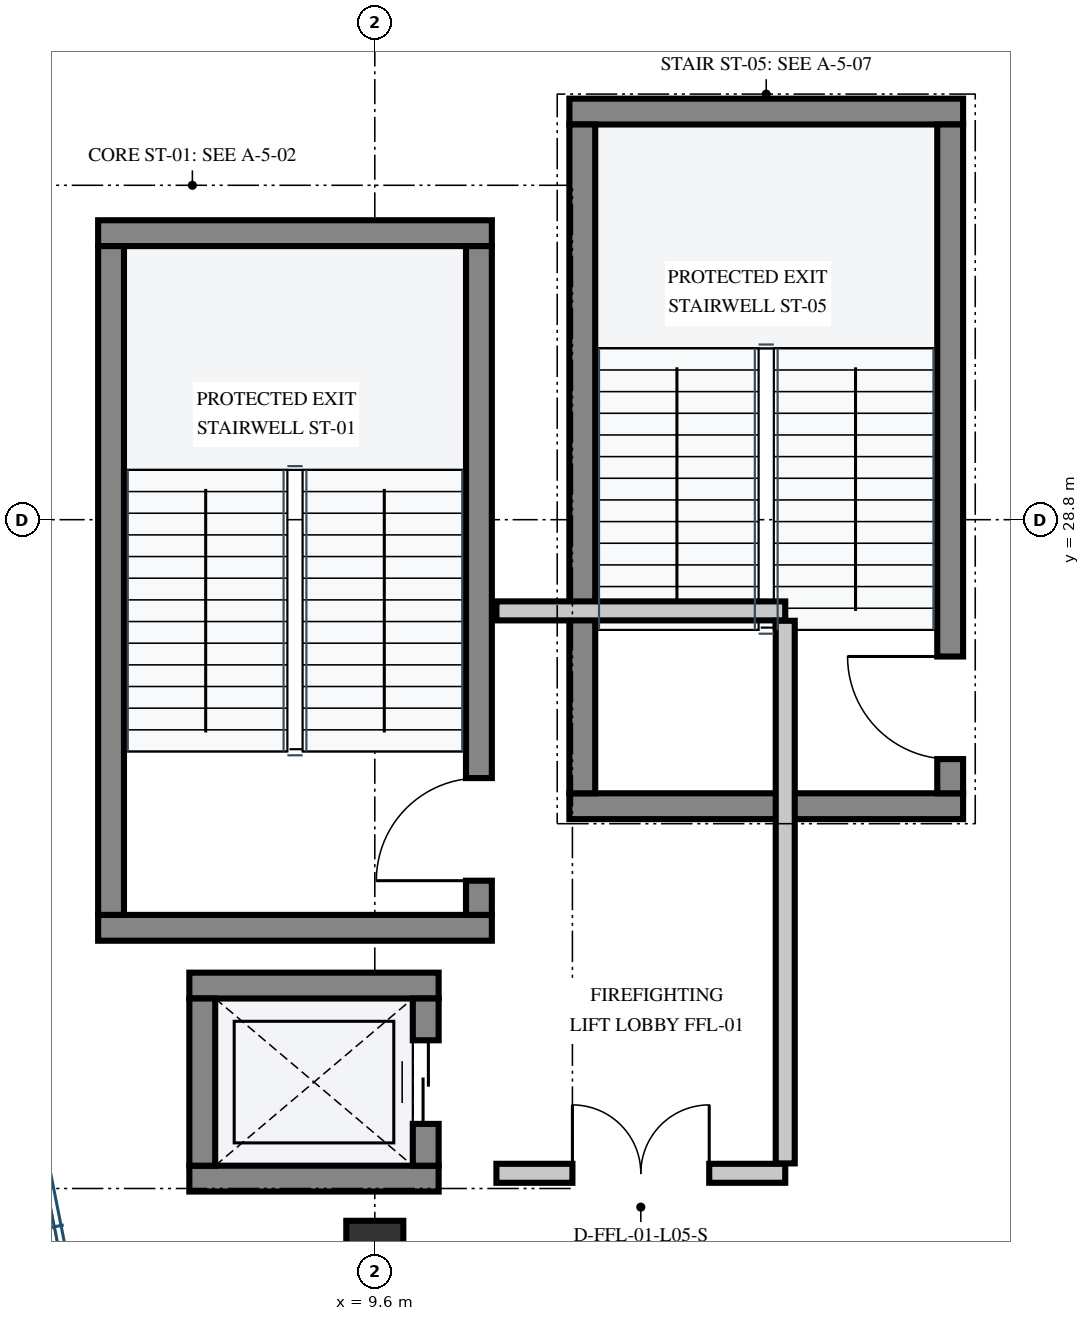
"""IFC4 building model, lengths in metres.
Left out: names, types, materials, properties, quantities, classifications, styles, units other than length and angle.
Written with IfcOpenShell. Run it as: python <this file> out.ifc"""

import sys

from ifc_helpers import new_model, si_unit, direction, frame, frame_2d, origin, origin_2d, place, context, subcontext, project, spatial, rectangle, extrude, element, fill, save


model = new_model("IFC4")
c1 = context("Model", 3, precision=1e-05, world=origin(), true_north=direction((0.0, 1.0)))
c2 = subcontext(c1, "Body", "Model", "MODEL_VIEW")
j1 = project(units=[si_unit("LENGTHUNIT", "METRE"), si_unit("PLANEANGLEUNIT", "RADIAN")], contexts=[c1])
p1 = place(None, origin())
s1 = spatial("IfcSite", under=j1, at=p1, CompositionType="ELEMENT")
p2 = place(p1, origin())
s2 = spatial("IfcBuilding", under=s1, at=p2, CompositionType="ELEMENT")
p3 = place(p2, frame((0.0, 0.0, 24.6)))
s3 = spatial("IfcBuildingStorey", under=s2, at=p3, CompositionType="ELEMENT", Elevation=24.6)
p4 = place(p3, frame((9.6, 19.2, 0.0), z_axis=(0.0, 0.0, 1.0), x_axis=(1.0, 0.0, 0.0)))
e1 = element("IfcColumn", 1, at=p4, inside=s3, PredefinedType="COLUMN", context=c2, shape_type="SweptSolid", body=[
    extrude(rectangle(XDim=0.75, YDim=0.75, at=origin_2d()), origin(), (0.0, 0.0, 1.0), 4.8),
])
for number, where, z_axis, x_axis in (
    (2, (5.96, 23.43, 0.0), (0.0, 0.0, 1.0), (1.0, 0.0, 0.0)),
    (3, (5.96, 32.57, 0.0), (0.0, 0.0, 1.0), (1.0, 0.0, 0.0)),
):
    element("IfcWall", number, at=place(p3, frame(where, z_axis=z_axis, x_axis=x_axis)), inside=s3, PredefinedType="SHEAR", context=c2, shape_type="SweptSolid", body=[
        extrude(rectangle(XDim=5.18, YDim=0.34, at=frame_2d((2.59, 0.0))), origin(), (0.0, 0.0, 1.0), 4.51),
    ])
p5 = place(p3, frame((10.97, 23.6, 0.0), z_axis=(0.0, 0.0, 1.0), x_axis=(0.0, 1.0, 0.0)))
e4 = element("IfcWall", 4, at=p5, inside=s3, PredefinedType="SHEAR", context=c2, shape_type="SweptSolid", body=[
    extrude(rectangle(XDim=8.8, YDim=0.34, at=frame_2d((4.4, 0.0))), origin(), (0.0, 0.0, 1.0), 4.51),
])
p6 = place(p5, frame((0.45, 0.0, 0.0)))
e5 = element("IfcOpeningElement", 5, at=p6, cuts=e4, PredefinedType="OPENING", context=c2, shape_type="SweptSolid", body=[
    extrude(rectangle(XDim=1.35, YDim=2.2, at=frame_2d((0.675, 1.1))), frame((0.0, 0.182, 0.0), z_axis=(0.0, -1.0, 0.0), x_axis=(1.0, 0.0, 0.0)), (0.0, 0.0, 1.0), 0.364),
])
p7 = place(p3, frame((6.13, 23.6, 0.0), z_axis=(0.0, 0.0, 1.0), x_axis=(0.0, 1.0, 0.0)))
e6 = element("IfcWall", 6, at=p7, inside=s3, PredefinedType="SHEAR", context=c2, shape_type="SweptSolid", body=[
    extrude(rectangle(XDim=8.8, YDim=0.34, at=frame_2d((4.4, 0.0))), origin(), (0.0, 0.0, 1.0), 4.51),
])
for number, where, z_axis, x_axis in (
    (7, (12.16, 25.03, 0.0), (0.0, 0.0, 1.0), (1.0, 0.0, 0.0)),
    (8, (12.16, 34.17, 0.0), (0.0, 0.0, 1.0), (1.0, 0.0, 0.0)),
):
    element("IfcWall", number, at=place(p3, frame(where, z_axis=z_axis, x_axis=x_axis)), inside=s3, PredefinedType="SHEAR", context=c2, shape_type="SweptSolid", body=[
        extrude(rectangle(XDim=5.18, YDim=0.34, at=frame_2d((2.59, 0.0))), origin(), (0.0, 0.0, 1.0), 4.51),
    ])
p8 = place(p3, frame((17.17, 25.2, 0.0), z_axis=(0.0, 0.0, 1.0), x_axis=(0.0, 1.0, 0.0)))
e9 = element("IfcWall", 9, at=p8, inside=s3, PredefinedType="SHEAR", context=c2, shape_type="SweptSolid", body=[
    extrude(rectangle(XDim=8.8, YDim=0.34, at=frame_2d((4.4, 0.0))), origin(), (0.0, 0.0, 1.0), 4.51),
])
p9 = place(p8, frame((0.45, 0.0, 0.0)))
e10 = element("IfcOpeningElement", 10, at=p9, cuts=e9, PredefinedType="OPENING", context=c2, shape_type="SweptSolid", body=[
    extrude(rectangle(XDim=1.35, YDim=2.2, at=frame_2d((0.675, 1.1))), frame((0.0, 0.182, 0.0), z_axis=(0.0, -1.0, 0.0), x_axis=(1.0, 0.0, 0.0)), (0.0, 0.0, 1.0), 0.364),
])
p10 = place(p3, frame((12.33, 25.2, 0.0), z_axis=(0.0, 0.0, 1.0), x_axis=(0.0, 1.0, 0.0)))
e11 = element("IfcWall", 11, at=p10, inside=s3, PredefinedType="SHEAR", context=c2, shape_type="SweptSolid", body=[
    extrude(rectangle(XDim=8.8, YDim=0.34, at=frame_2d((4.4, 0.0))), origin(), (0.0, 0.0, 1.0), 4.51),
])
for number, where, z_axis, x_axis in (
    (12, (7.16, 20.13, 0.0), (0.0, 0.0, 1.0), (1.0, 0.0, 0.0)),
    (13, (7.16, 22.67, 0.0), (0.0, 0.0, 1.0), (1.0, 0.0, 0.0)),
):
    element("IfcWall", number, at=place(p3, frame(where, z_axis=z_axis, x_axis=x_axis)), inside=s3, PredefinedType="SHEAR", context=c2, shape_type="SweptSolid", body=[
        extrude(rectangle(XDim=3.28, YDim=0.34, at=frame_2d((1.64, 0.0))), origin(), (0.0, 0.0, 1.0), 4.51),
    ])
p11 = place(p3, frame((7.33, 20.3, 0.0), z_axis=(0.0, 0.0, 1.0), x_axis=(0.0, 1.0, 0.0)))
e14 = element("IfcWall", 14, at=p11, inside=s3, PredefinedType="SHEAR", context=c2, shape_type="SweptSolid", body=[
    extrude(rectangle(XDim=2.2, YDim=0.34, at=frame_2d((1.1, 0.0))), origin(), (0.0, 0.0, 1.0), 4.51),
])
p12 = place(p3, frame((10.27, 20.3, 0.0), z_axis=(0.0, 0.0, 1.0), x_axis=(0.0, 1.0, 0.0)))
e15 = element("IfcWall", 15, at=p12, inside=s3, PredefinedType="SHEAR", context=c2, shape_type="SweptSolid", body=[
    extrude(rectangle(XDim=2.2, YDim=0.34, at=frame_2d((1.1, 0.0))), origin(), (0.0, 0.0, 1.0), 4.51),
])
p13 = place(p12, frame((0.55, 0.0, 0.0)))
e16 = element("IfcOpeningElement", 16, at=p13, cuts=e15, PredefinedType="OPENING", context=c2, shape_type="SweptSolid", body=[
    extrude(rectangle(XDim=1.1, YDim=2.15, at=frame_2d((0.55, 1.075))), frame((0.0, 0.182, 0.0), z_axis=(0.0, -1.0, 0.0), x_axis=(1.0, 0.0, 0.0)), (0.0, 0.0, 1.0), 0.364),
])
p14 = place(p3, frame((11.2, 20.2, 0.0), z_axis=(0.0, 0.0, 1.0), x_axis=(1.0, 0.0, 0.0)))
e17 = element("IfcWall", 17, at=p14, inside=s3, PredefinedType="PARTITIONING", context=c2, shape_type="SweptSolid", body=[
    extrude(rectangle(XDim=3.8, YDim=0.25, at=frame_2d((1.9, 0.0))), origin(), (0.0, 0.0, 1.0), 4.51),
])
p15 = place(p14, frame((1.0, 0.0, 0.0)))
e18 = element("IfcOpeningElement", 18, at=p15, cuts=e17, PredefinedType="OPENING", context=c2, shape_type="SweptSolid", body=[
    extrude(rectangle(XDim=1.8, YDim=2.25, at=frame_2d((0.9, 1.125))), frame((0.0, 0.137, 0.0), z_axis=(0.0, -1.0, 0.0), x_axis=(1.0, 0.0, 0.0)), (0.0, 0.0, 1.0), 0.274),
])
p16 = place(p3, frame((11.2, 27.6, 0.0), z_axis=(0.0, 0.0, 1.0), x_axis=(1.0, 0.0, 0.0)))
e19 = element("IfcWall", 19, at=p16, inside=s3, PredefinedType="PARTITIONING", context=c2, shape_type="SweptSolid", body=[
    extrude(rectangle(XDim=3.8, YDim=0.25, at=frame_2d((1.9, 0.0))), origin(), (0.0, 0.0, 1.0), 4.51),
])
p17 = place(p3, frame((15.0, 20.33, 0.0), z_axis=(0.0, 0.0, 1.0), x_axis=(0.0, 1.0, 0.0)))
e20 = element("IfcWall", 20, at=p17, inside=s3, PredefinedType="PARTITIONING", context=c2, shape_type="SweptSolid", body=[
    extrude(rectangle(XDim=7.14, YDim=0.25, at=frame_2d((3.57, 0.0))), origin(), (0.0, 0.0, 1.0), 4.51),
])
p18 = place(p6, origin())
e21 = element("IfcDoor", 21, at=p18, inside=s3, OperationType="SINGLE_SWING_LEFT", PredefinedType="DOOR", context=c2, shape_type="SweptSolid", body=[
    extrude(rectangle(XDim=1.35, YDim=2.2, at=frame_2d((0.675, 1.1))), frame((0.0, 0.025, 0.0), z_axis=(0.0, -1.0, 0.0), x_axis=(1.0, 0.0, 0.0)), (0.0, 0.0, 1.0), 0.05),
])
fill(e5, e21)
p19 = place(p9, origin())
e22 = element("IfcDoor", 22, at=p19, inside=s3, OperationType="SINGLE_SWING_RIGHT", PredefinedType="DOOR", context=c2, shape_type="SweptSolid", body=[
    extrude(rectangle(XDim=1.35, YDim=2.2, at=frame_2d((0.675, 1.1))), frame((0.0, 0.025, 0.0), z_axis=(0.0, -1.0, 0.0), x_axis=(1.0, 0.0, 0.0)), (0.0, 0.0, 1.0), 0.05),
])
fill(e10, e22)
p20 = place(p13, origin())
e23 = element("IfcDoor", 23, at=p20, inside=s3, OperationType="DOUBLE_DOOR_SLIDING", PredefinedType="DOOR", context=c2, shape_type="SweptSolid", body=[
    extrude(rectangle(XDim=1.1, YDim=2.15, at=frame_2d((0.55, 1.075))), frame((0.0, 0.025, 0.0), z_axis=(0.0, -1.0, 0.0), x_axis=(1.0, 0.0, 0.0)), (0.0, 0.0, 1.0), 0.05),
])
fill(e16, e23)
p21 = place(p15, origin())
e24 = element("IfcDoor", 24, at=p21, inside=s3, OperationType="DOUBLE_DOOR_SINGLE_SWING", PredefinedType="DOOR", context=c2, shape_type="SweptSolid", body=[
    extrude(rectangle(XDim=1.8, YDim=2.25, at=frame_2d((0.9, 1.125))), frame((0.0, 0.025, 0.0), z_axis=(0.0, -1.0, 0.0), x_axis=(1.0, 0.0, 0.0)), (0.0, 0.0, 1.0), 0.05),
])
fill(e18, e24)
save(model, sys.argv[1])
